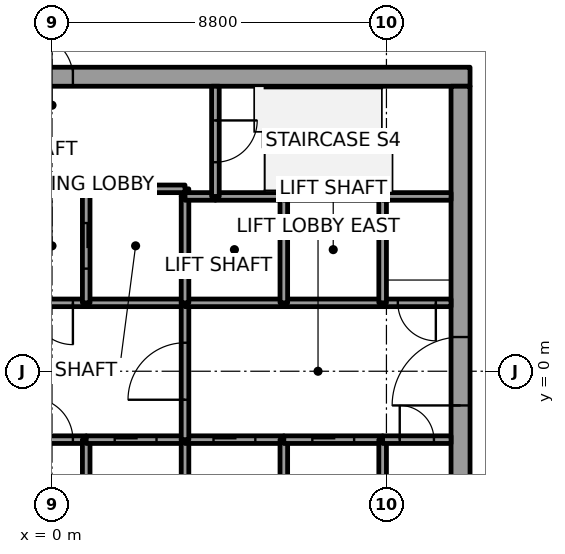
"""IFC4 building model, lengths in metres.
Left out: names, types, materials, properties, quantities, classifications, styles, units other than length and angle.
Written with IfcOpenShell. Run it as: python <this file> out.ifc"""

import sys

from ifc_helpers import new_model, si_unit, direction, frame, frame_2d, origin, place, context, subcontext, project, spatial, rectangle, extrude, element, fill, save


model = new_model("IFC4")
c1 = context("Model", 3, precision=1e-05, world=origin(), true_north=direction((0.0, 1.0)))
c2 = subcontext(c1, "Body", "Model", "MODEL_VIEW")
j1 = project(units=[si_unit("LENGTHUNIT", "METRE"), si_unit("PLANEANGLEUNIT", "RADIAN")], contexts=[c1])
p1 = place(None, origin())
s1 = spatial("IfcSite", under=j1, at=p1, CompositionType="ELEMENT")
p2 = place(p1, origin())
s2 = spatial("IfcBuilding", under=s1, at=p2, CompositionType="ELEMENT")
p3 = place(p2, frame((0.0, 0.0, 141.8)))
s3 = spatial("IfcBuildingStorey", under=s2, at=p3, CompositionType="ELEMENT", Elevation=141.8)
p4 = place(p3, frame((-11.0, 7.75, 0.0), z_axis=(0.0, 0.0, 1.0), x_axis=(1.0, 0.0, 0.0)))
e1 = element("IfcWall", 1, at=p4, inside=s3, PredefinedType="SHEAR", context=c2, shape_type="SweptSolid", body=[
    extrude(rectangle(XDim=22.0, YDim=0.5, at=frame_2d((11.0, 0.0))), origin(), (0.0, 0.0, 1.0), 4.0),
])
p5 = place(p4, frame((10.45, 0.0, 0.0)))
e2 = element("IfcOpeningElement", 2, at=p5, cuts=e1, PredefinedType="OPENING", context=c2, shape_type="SweptSolid", body=[
    extrude(rectangle(XDim=1.1, YDim=2.1, at=frame_2d((0.55, 1.05))), frame((0.0, 0.25, 0.0), z_axis=(0.0, -1.0, 0.0), x_axis=(1.0, 0.0, 0.0)), (0.0, 0.0, 1.0), 0.5),
])
p6 = place(p3, frame((10.75, -7.5, 0.0), z_axis=(0.0, 0.0, 1.0), x_axis=(0.0, 1.0, 0.0)))
e3 = element("IfcWall", 3, at=p6, inside=s3, PredefinedType="SHEAR", context=c2, shape_type="SweptSolid", body=[
    extrude(rectangle(XDim=15.0, YDim=0.5, at=frame_2d((7.5, 0.0))), origin(), (0.0, 0.0, 1.0), 4.0),
])
p7 = place(p6, frame((6.6, 0.0, 0.0)))
e4 = element("IfcOpeningElement", 4, at=p7, cuts=e3, PredefinedType="OPENING", context=c2, shape_type="SweptSolid", body=[
    extrude(rectangle(XDim=1.8, YDim=2.1, at=frame_2d((0.9, 1.05))), frame((0.0, 0.25, 0.0), z_axis=(0.0, -1.0, 0.0), x_axis=(1.0, 0.0, 0.0)), (0.0, 0.0, 1.0), 0.5),
])
p8 = place(p3, frame((-0.9, -1.8, 0.0), z_axis=(0.0, 0.0, 1.0), x_axis=(1.0, 0.0, 0.0)))
e5 = element("IfcWall", 5, at=p8, inside=s3, PredefinedType="SOLIDWALL", context=c2, shape_type="SweptSolid", body=[
    extrude(rectangle(XDim=1.8, YDim=0.2, at=frame_2d((0.9, 0.0))), origin(), (0.0, 0.0, 1.0), 3.85),
])
p9 = place(p8, frame((0.35, 0.0, 0.0)))
e6 = element("IfcOpeningElement", 6, at=p9, cuts=e5, PredefinedType="OPENING", context=c2, shape_type="SweptSolid", body=[
    extrude(rectangle(XDim=1.1, YDim=2.1, at=frame_2d((0.55, 1.05))), frame((0.0, 0.1, 0.0), z_axis=(0.0, -1.0, 0.0), x_axis=(1.0, 0.0, 0.0)), (0.0, 0.0, 1.0), 0.2),
])
p10 = place(p3, frame((0.9, 1.8, 0.0), z_axis=(0.0, 0.0, 1.0), x_axis=(-1.0, 0.0, 0.0)))
e7 = element("IfcWall", 7, at=p10, inside=s3, PredefinedType="SOLIDWALL", context=c2, shape_type="SweptSolid", body=[
    extrude(rectangle(XDim=1.8, YDim=0.2, at=frame_2d((0.9, 0.0))), origin(), (0.0, 0.0, 1.0), 3.85),
])
p11 = place(p10, frame((0.35, 0.0, 0.0)))
e8 = element("IfcOpeningElement", 8, at=p11, cuts=e7, PredefinedType="OPENING", context=c2, shape_type="SweptSolid", body=[
    extrude(rectangle(XDim=1.1, YDim=2.1, at=frame_2d((0.55, 1.05))), frame((0.0, 0.1, 0.0), z_axis=(0.0, -1.0, 0.0), x_axis=(1.0, 0.0, 0.0)), (0.0, 0.0, 1.0), 0.2),
])
p12 = place(p3, frame((0.9, -1.8, 0.0), z_axis=(0.0, 0.0, 1.0), x_axis=(0.0, -1.0, 0.0)))
e9 = element("IfcWall", 9, at=p12, inside=s3, PredefinedType="SOLIDWALL", context=c2, shape_type="SweptSolid", body=[
    extrude(rectangle(XDim=2.8, YDim=0.2, at=frame_2d((1.4, 0.0))), origin(), (0.0, 0.0, 1.0), 3.85),
])
p13 = place(p3, frame((0.9, -1.8, 0.0), z_axis=(0.0, 0.0, 1.0), x_axis=(1.0, 0.0, 0.0)))
e10 = element("IfcWall", 10, at=p13, inside=s3, PredefinedType="SOLIDWALL", context=c2, shape_type="SweptSolid", body=[
    extrude(rectangle(XDim=2.6, YDim=0.2, at=frame_2d((1.3, 0.0))), origin(), (0.0, 0.0, 1.0), 3.85),
])
p14 = place(p13, frame((0.75, 0.0, 0.0)))
e11 = element("IfcOpeningElement", 11, at=p14, cuts=e10, PredefinedType="OPENING", context=c2, shape_type="SweptSolid", body=[
    extrude(rectangle(XDim=1.1, YDim=2.1, at=frame_2d((0.55, 1.05))), frame((0.0, 0.1, 0.0), z_axis=(0.0, -1.0, 0.0), x_axis=(1.0, 0.0, 0.0)), (0.0, 0.0, 1.0), 0.2),
])
p15 = place(p3, frame((3.5, 1.8, 0.0), z_axis=(0.0, 0.0, 1.0), x_axis=(-1.0, 0.0, 0.0)))
e12 = element("IfcWall", 12, at=p15, inside=s3, PredefinedType="SOLIDWALL", context=c2, shape_type="SweptSolid", body=[
    extrude(rectangle(XDim=2.6, YDim=0.2, at=frame_2d((1.3, 0.0))), origin(), (0.0, 0.0, 1.0), 3.85),
])
p16 = place(p3, frame((3.5, 4.6, 0.0), z_axis=(0.0, 0.0, 1.0), x_axis=(0.0, 1.0, 0.0)))
e13 = element("IfcWall", 13, at=p16, inside=s3, PredefinedType="SOLIDWALL", context=c2, shape_type="SweptSolid", body=[
    extrude(rectangle(XDim=0.2, YDim=0.2, at=frame_2d((0.1, 0.0))), origin(), (0.0, 0.0, 1.0), 3.85),
])
p17 = place(p3, frame((3.5, 4.8, 0.0), z_axis=(0.0, 0.0, 1.0), x_axis=(-1.0, 0.0, 0.0)))
e14 = element("IfcWall", 14, at=p17, inside=s3, PredefinedType="SOLIDWALL", context=c2, shape_type="SweptSolid", body=[
    extrude(rectangle(XDim=2.6, YDim=0.2, at=frame_2d((1.3, 0.0))), origin(), (0.0, 0.0, 1.0), 3.85),
])
p18 = place(p3, frame((0.9, 4.8, 0.0), z_axis=(0.0, 0.0, 1.0), x_axis=(0.0, -1.0, 0.0)))
e15 = element("IfcWall", 15, at=p18, inside=s3, PredefinedType="SOLIDWALL", context=c2, shape_type="SweptSolid", body=[
    extrude(rectangle(XDim=3.0, YDim=0.2, at=frame_2d((1.5, 0.0))), origin(), (0.0, 0.0, 1.0), 3.85),
])
p19 = place(p18, frame((0.9, 0.0, 0.0)))
e16 = element("IfcOpeningElement", 16, at=p19, cuts=e15, PredefinedType="OPENING", context=c2, shape_type="SweptSolid", body=[
    extrude(rectangle(XDim=1.2, YDim=2.1, at=frame_2d((0.6, 1.05))), frame((0.0, 0.1, 0.0), z_axis=(0.0, -1.0, 0.0), x_axis=(1.0, 0.0, 0.0)), (0.0, 0.0, 1.0), 0.2),
])
p20 = place(p3, frame((3.5, -4.6, 0.0), z_axis=(0.0, 0.0, 1.0), x_axis=(0.0, 1.0, 0.0)))
e17 = element("IfcWall", 17, at=p20, inside=s3, PredefinedType="SOLIDWALL", context=c2, shape_type="SweptSolid", body=[
    extrude(rectangle(XDim=2.8, YDim=0.2, at=frame_2d((1.4, 0.0))), origin(), (0.0, 0.0, 1.0), 3.85),
])
p21 = place(p3, frame((3.5, -1.8, 0.0), z_axis=(0.0, 0.0, 1.0), x_axis=(1.0, 0.0, 0.0)))
e18 = element("IfcWall", 18, at=p21, inside=s3, PredefinedType="SOLIDWALL", context=c2, shape_type="SweptSolid", body=[
    extrude(rectangle(XDim=2.6, YDim=0.2, at=frame_2d((1.3, 0.0))), origin(), (0.0, 0.0, 1.0), 3.85),
])
p22 = place(p21, frame((0.75, 0.0, 0.0)))
e19 = element("IfcOpeningElement", 19, at=p22, cuts=e18, PredefinedType="OPENING", context=c2, shape_type="SweptSolid", body=[
    extrude(rectangle(XDim=1.1, YDim=2.1, at=frame_2d((0.55, 1.05))), frame((0.0, 0.1, 0.0), z_axis=(0.0, -1.0, 0.0), x_axis=(1.0, 0.0, 0.0)), (0.0, 0.0, 1.0), 0.2),
])
p23 = place(p3, frame((3.5, -1.8, 0.0), z_axis=(0.0, 0.0, 1.0), x_axis=(0.0, 1.0, 0.0)))
e20 = element("IfcWall", 20, at=p23, inside=s3, PredefinedType="SOLIDWALL", context=c2, shape_type="SweptSolid", body=[
    extrude(rectangle(XDim=3.6, YDim=0.2, at=frame_2d((1.8, 0.0))), origin(), (0.0, 0.0, 1.0), 3.85),
])
p24 = place(p23, frame((1.05, 0.0, 0.0)))
e21 = element("IfcOpeningElement", 21, at=p24, cuts=e20, PredefinedType="OPENING", context=c2, shape_type="SweptSolid", body=[
    extrude(rectangle(XDim=1.5, YDim=2.1, at=frame_2d((0.75, 1.05))), frame((0.0, 0.1, 0.0), z_axis=(0.0, -1.0, 0.0), x_axis=(1.0, 0.0, 0.0)), (0.0, 0.0, 1.0), 0.2),
])
p25 = place(p3, frame((6.1, 1.8, 0.0), z_axis=(0.0, 0.0, 1.0), x_axis=(-1.0, 0.0, 0.0)))
e22 = element("IfcWall", 22, at=p25, inside=s3, PredefinedType="SOLIDWALL", context=c2, shape_type="SweptSolid", body=[
    extrude(rectangle(XDim=2.6, YDim=0.2, at=frame_2d((1.3, 0.0))), origin(), (0.0, 0.0, 1.0), 3.85),
])
p26 = place(p3, frame((3.5, 1.8, 0.0), z_axis=(0.0, 0.0, 1.0), x_axis=(0.0, 1.0, 0.0)))
e23 = element("IfcWall", 23, at=p26, inside=s3, PredefinedType="SOLIDWALL", context=c2, shape_type="SweptSolid", body=[
    extrude(rectangle(XDim=2.8, YDim=0.2, at=frame_2d((1.4, 0.0))), origin(), (0.0, 0.0, 1.0), 3.85),
])
p27 = place(p3, frame((4.3, 4.6, 0.0), z_axis=(0.0, 0.0, 1.0), x_axis=(-1.0, 0.0, 0.0)))
e24 = element("IfcWall", 24, at=p27, inside=s3, PredefinedType="SOLIDWALL", context=c2, shape_type="SweptSolid", body=[
    extrude(rectangle(XDim=0.8, YDim=0.2, at=frame_2d((0.4, 0.0))), origin(), (0.0, 0.0, 1.0), 3.85),
])
p28 = place(p3, frame((6.1, 4.6, 0.0), z_axis=(0.0, 0.0, 1.0), x_axis=(-1.0, 0.0, 0.0)))
e25 = element("IfcWall", 25, at=p28, inside=s3, PredefinedType="SOLIDWALL", context=c2, shape_type="SweptSolid", body=[
    extrude(rectangle(XDim=1.8, YDim=0.2, at=frame_2d((0.9, 0.0))), origin(), (0.0, 0.0, 1.0), 3.85),
])
p29 = place(p3, frame((4.3, 7.5, 0.0), z_axis=(0.0, 0.0, 1.0), x_axis=(0.0, -1.0, 0.0)))
e26 = element("IfcWall", 26, at=p29, inside=s3, PredefinedType="SOLIDWALL", context=c2, shape_type="SweptSolid", body=[
    extrude(rectangle(XDim=2.9, YDim=0.2, at=frame_2d((1.45, 0.0))), origin(), (0.0, 0.0, 1.0), 3.85),
])
p30 = place(p29, frame((0.9, 0.0, 0.0)))
e27 = element("IfcOpeningElement", 27, at=p30, cuts=e26, PredefinedType="OPENING", context=c2, shape_type="SweptSolid", body=[
    extrude(rectangle(XDim=1.1, YDim=2.1, at=frame_2d((0.55, 1.05))), frame((0.0, 0.1, 0.0), z_axis=(0.0, -1.0, 0.0), x_axis=(1.0, 0.0, 0.0)), (0.0, 0.0, 1.0), 0.2),
])
p31 = place(p3, frame((6.1, -4.6, 0.0), z_axis=(0.0, 0.0, 1.0), x_axis=(0.0, 1.0, 0.0)))
e28 = element("IfcWall", 28, at=p31, inside=s3, PredefinedType="SOLIDWALL", context=c2, shape_type="SweptSolid", body=[
    extrude(rectangle(XDim=2.8, YDim=0.2, at=frame_2d((1.4, 0.0))), origin(), (0.0, 0.0, 1.0), 3.85),
])
p32 = place(p3, frame((6.1, -1.8, 0.0), z_axis=(0.0, 0.0, 1.0), x_axis=(1.0, 0.0, 0.0)))
e29 = element("IfcWall", 29, at=p32, inside=s3, PredefinedType="SOLIDWALL", context=c2, shape_type="SweptSolid", body=[
    extrude(rectangle(XDim=2.6, YDim=0.2, at=frame_2d((1.3, 0.0))), origin(), (0.0, 0.0, 1.0), 3.85),
])
p33 = place(p32, frame((0.75, 0.0, 0.0)))
e30 = element("IfcOpeningElement", 30, at=p33, cuts=e29, PredefinedType="OPENING", context=c2, shape_type="SweptSolid", body=[
    extrude(rectangle(XDim=1.1, YDim=2.1, at=frame_2d((0.55, 1.05))), frame((0.0, 0.1, 0.0), z_axis=(0.0, -1.0, 0.0), x_axis=(1.0, 0.0, 0.0)), (0.0, 0.0, 1.0), 0.2),
])
p34 = place(p3, frame((8.7, 1.8, 0.0), z_axis=(0.0, 0.0, 1.0), x_axis=(-1.0, 0.0, 0.0)))
e31 = element("IfcWall", 31, at=p34, inside=s3, PredefinedType="SOLIDWALL", context=c2, shape_type="SweptSolid", body=[
    extrude(rectangle(XDim=2.6, YDim=0.2, at=frame_2d((1.3, 0.0))), origin(), (0.0, 0.0, 1.0), 3.85),
])
p35 = place(p3, frame((6.1, 1.8, 0.0), z_axis=(0.0, 0.0, 1.0), x_axis=(0.0, 1.0, 0.0)))
e32 = element("IfcWall", 32, at=p35, inside=s3, PredefinedType="SOLIDWALL", context=c2, shape_type="SweptSolid", body=[
    extrude(rectangle(XDim=2.8, YDim=0.2, at=frame_2d((1.4, 0.0))), origin(), (0.0, 0.0, 1.0), 3.85),
])
p36 = place(p3, frame((8.7, 4.6, 0.0), z_axis=(0.0, 0.0, 1.0), x_axis=(-1.0, 0.0, 0.0)))
e33 = element("IfcWall", 33, at=p36, inside=s3, PredefinedType="SOLIDWALL", context=c2, shape_type="SweptSolid", body=[
    extrude(rectangle(XDim=2.6, YDim=0.2, at=frame_2d((1.3, 0.0))), origin(), (0.0, 0.0, 1.0), 3.85),
])
p37 = place(p3, frame((8.7, -1.8, 0.0), z_axis=(0.0, 0.0, 1.0), x_axis=(0.0, -1.0, 0.0)))
e34 = element("IfcWall", 34, at=p37, inside=s3, PredefinedType="SOLIDWALL", context=c2, shape_type="SweptSolid", body=[
    extrude(rectangle(XDim=2.8, YDim=0.2, at=frame_2d((1.4, 0.0))), origin(), (0.0, 0.0, 1.0), 3.85),
])
p38 = place(p3, frame((8.7, -1.8, 0.0), z_axis=(0.0, 0.0, 1.0), x_axis=(1.0, 0.0, 0.0)))
e35 = element("IfcWall", 35, at=p38, inside=s3, PredefinedType="SOLIDWALL", context=c2, shape_type="SweptSolid", body=[
    extrude(rectangle(XDim=1.8, YDim=0.2, at=frame_2d((0.9, 0.0))), origin(), (0.0, 0.0, 1.0), 3.85),
])
p39 = place(p38, frame((0.45, 0.0, 0.0)))
e36 = element("IfcOpeningElement", 36, at=p39, cuts=e35, PredefinedType="OPENING", context=c2, shape_type="SweptSolid", body=[
    extrude(rectangle(XDim=0.9, YDim=2.1, at=frame_2d((0.45, 1.05))), frame((0.0, 0.1, 0.0), z_axis=(0.0, -1.0, 0.0), x_axis=(1.0, 0.0, 0.0)), (0.0, 0.0, 1.0), 0.2),
])
p40 = place(p3, frame((10.5, 1.8, 0.0), z_axis=(0.0, 0.0, 1.0), x_axis=(-1.0, 0.0, 0.0)))
e37 = element("IfcWall", 37, at=p40, inside=s3, PredefinedType="SOLIDWALL", context=c2, shape_type="SweptSolid", body=[
    extrude(rectangle(XDim=1.8, YDim=0.2, at=frame_2d((0.9, 0.0))), origin(), (0.0, 0.0, 1.0), 3.85),
])
p41 = place(p40, frame((0.4, 0.0, 0.0)))
e38 = element("IfcOpeningElement", 38, at=p41, cuts=e37, PredefinedType="OPENING", context=c2, shape_type="SweptSolid", body=[
    extrude(rectangle(XDim=1.0, YDim=2.1, at=frame_2d((0.5, 1.05))), frame((0.0, 0.1, 0.0), z_axis=(0.0, -1.0, 0.0), x_axis=(1.0, 0.0, 0.0)), (0.0, 0.0, 1.0), 0.2),
])
p42 = place(p3, frame((8.7, 4.6, 0.0), z_axis=(0.0, 0.0, 1.0), x_axis=(0.0, -1.0, 0.0)))
e39 = element("IfcWall", 39, at=p42, inside=s3, PredefinedType="SOLIDWALL", context=c2, shape_type="SweptSolid", body=[
    extrude(rectangle(XDim=2.8, YDim=0.2, at=frame_2d((1.4, 0.0))), origin(), (0.0, 0.0, 1.0), 3.85),
])
p43 = place(p3, frame((10.5, 4.6, 0.0), z_axis=(0.0, 0.0, 1.0), x_axis=(-1.0, 0.0, 0.0)))
e40 = element("IfcWall", 40, at=p43, inside=s3, PredefinedType="SOLIDWALL", context=c2, shape_type="SweptSolid", body=[
    extrude(rectangle(XDim=1.8, YDim=0.2, at=frame_2d((0.9, 0.0))), origin(), (0.0, 0.0, 1.0), 3.85),
])
p44 = place(p14, origin())
e41 = element("IfcDoor", 41, at=p44, inside=s3, OperationType="SLIDING_TO_RIGHT", PredefinedType="DOOR", context=c2, shape_type="SweptSolid", body=[
    extrude(rectangle(XDim=1.1, YDim=2.1, at=frame_2d((0.55, 1.05))), frame((0.0, 0.025, 0.0), z_axis=(0.0, -1.0, 0.0), x_axis=(1.0, 0.0, 0.0)), (0.0, 0.0, 1.0), 0.05),
])
fill(e11, e41)
p45 = place(p22, origin())
e42 = element("IfcDoor", 42, at=p45, inside=s3, OperationType="SLIDING_TO_RIGHT", PredefinedType="DOOR", context=c2, shape_type="SweptSolid", body=[
    extrude(rectangle(XDim=1.1, YDim=2.1, at=frame_2d((0.55, 1.05))), frame((0.0, 0.025, 0.0), z_axis=(0.0, -1.0, 0.0), x_axis=(1.0, 0.0, 0.0)), (0.0, 0.0, 1.0), 0.05),
])
fill(e19, e42)
p46 = place(p33, origin())
e43 = element("IfcDoor", 43, at=p46, inside=s3, OperationType="SLIDING_TO_RIGHT", PredefinedType="DOOR", context=c2, shape_type="SweptSolid", body=[
    extrude(rectangle(XDim=1.1, YDim=2.1, at=frame_2d((0.55, 1.05))), frame((0.0, 0.025, 0.0), z_axis=(0.0, -1.0, 0.0), x_axis=(1.0, 0.0, 0.0)), (0.0, 0.0, 1.0), 0.05),
])
fill(e30, e43)
p47 = place(p19, origin())
e44 = element("IfcDoor", 44, at=p47, inside=s3, OperationType="SLIDING_TO_LEFT", PredefinedType="DOOR", context=c2, shape_type="SweptSolid", body=[
    extrude(rectangle(XDim=1.2, YDim=2.1, at=frame_2d((0.6, 1.05))), frame((0.0, 0.025, 0.0), z_axis=(0.0, -1.0, 0.0), x_axis=(1.0, 0.0, 0.0)), (0.0, 0.0, 1.0), 0.05),
])
fill(e16, e44)
p48 = place(p24, origin())
e45 = element("IfcDoor", 45, at=p48, inside=s3, OperationType="DOUBLE_DOOR_SINGLE_SWING", PredefinedType="DOOR", context=c2, shape_type="SweptSolid", body=[
    extrude(rectangle(XDim=1.5, YDim=2.1, at=frame_2d((0.75, 1.05))), frame((0.0, 0.025, 0.0), z_axis=(0.0, -1.0, 0.0), x_axis=(1.0, 0.0, 0.0)), (0.0, 0.0, 1.0), 0.05),
])
fill(e21, e45)
p49 = place(p11, origin())
e46 = element("IfcDoor", 46, at=p49, inside=s3, OperationType="SINGLE_SWING_RIGHT", PredefinedType="DOOR", context=c2, shape_type="SweptSolid", body=[
    extrude(rectangle(XDim=1.1, YDim=2.1, at=frame_2d((0.55, 1.05))), frame((0.0, 0.025, 0.0), z_axis=(0.0, -1.0, 0.0), x_axis=(1.0, 0.0, 0.0)), (0.0, 0.0, 1.0), 0.05),
])
fill(e8, e46)
p50 = place(p9, origin())
e47 = element("IfcDoor", 47, at=p50, inside=s3, OperationType="SINGLE_SWING_LEFT", PredefinedType="DOOR", context=c2, shape_type="SweptSolid", body=[
    extrude(rectangle(XDim=1.1, YDim=2.1, at=frame_2d((0.55, 1.05))), frame((0.0, 0.025, 0.0), z_axis=(0.0, -1.0, 0.0), x_axis=(1.0, 0.0, 0.0)), (0.0, 0.0, 1.0), 0.05),
])
fill(e6, e47)
p51 = place(p41, origin())
e48 = element("IfcDoor", 48, at=p51, inside=s3, OperationType="SINGLE_SWING_RIGHT", PredefinedType="DOOR", context=c2, shape_type="SweptSolid", body=[
    extrude(rectangle(XDim=1.0, YDim=2.1, at=frame_2d((0.5, 1.05))), frame((0.0, 0.025, 0.0), z_axis=(0.0, -1.0, 0.0), x_axis=(1.0, 0.0, 0.0)), (0.0, 0.0, 1.0), 0.05),
])
fill(e38, e48)
p52 = place(p30, origin())
e49 = element("IfcDoor", 49, at=p52, inside=s3, OperationType="SINGLE_SWING_LEFT", PredefinedType="DOOR", context=c2, shape_type="SweptSolid", body=[
    extrude(rectangle(XDim=1.1, YDim=2.1, at=frame_2d((0.55, 1.05))), frame((0.0, 0.025, 0.0), z_axis=(0.0, -1.0, 0.0), x_axis=(1.0, 0.0, 0.0)), (0.0, 0.0, 1.0), 0.05),
])
fill(e27, e49)
p53 = place(p39, origin())
e50 = element("IfcDoor", 50, at=p53, inside=s3, OperationType="SINGLE_SWING_RIGHT", PredefinedType="DOOR", context=c2, shape_type="SweptSolid", body=[
    extrude(rectangle(XDim=0.9, YDim=2.1, at=frame_2d((0.45, 1.05))), frame((0.0, 0.025, 0.0), z_axis=(0.0, -1.0, 0.0), x_axis=(1.0, 0.0, 0.0)), (0.0, 0.0, 1.0), 0.05),
])
fill(e36, e50)
p54 = place(p7, origin())
e51 = element("IfcDoor", 51, at=p54, inside=s3, OperationType="DOUBLE_DOOR_SINGLE_SWING", PredefinedType="DOOR", context=c2, shape_type="SweptSolid", body=[
    extrude(rectangle(XDim=1.8, YDim=2.1, at=frame_2d((0.9, 1.05))), frame((0.0, 0.025, 0.0), z_axis=(0.0, -1.0, 0.0), x_axis=(1.0, 0.0, 0.0)), (0.0, 0.0, 1.0), 0.05),
])
fill(e4, e51)
p55 = place(p5, origin())
e52 = element("IfcDoor", 52, at=p55, inside=s3, OperationType="SINGLE_SWING_RIGHT", PredefinedType="DOOR", context=c2, shape_type="SweptSolid", body=[
    extrude(rectangle(XDim=1.1, YDim=2.1, at=frame_2d((0.55, 1.05))), frame((0.0, 0.025, 0.0), z_axis=(0.0, -1.0, 0.0), x_axis=(1.0, 0.0, 0.0)), (0.0, 0.0, 1.0), 0.05),
])
fill(e2, e52)
save(model, sys.argv[1])
